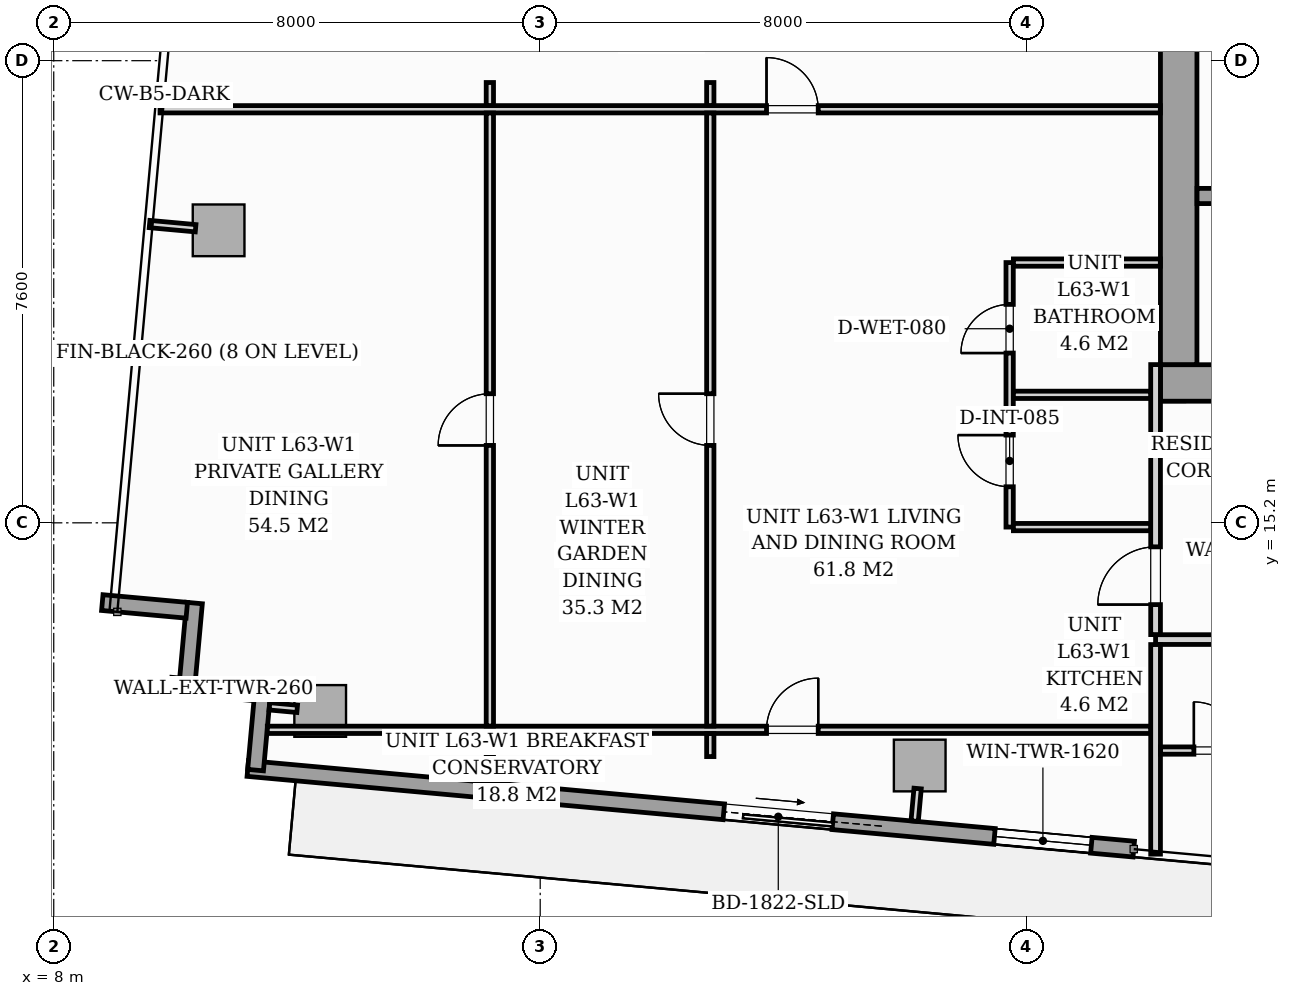
"""IFC4 building model, lengths in metres.
Left out: names, types, materials, properties, quantities, classifications, styles, units other than length and angle.
Written with IfcOpenShell. Run it as: python <this file> out.ifc"""

import sys

from ifc_helpers import new_model, si_unit, direction, frame, frame_2d, origin, origin_2d, place, context, subcontext, project, spatial, rectangle, i_section, extrude, source, transform, mapped, element, fill, save


model = new_model("IFC4")
c1 = context("Model", 3, precision=1e-05, world=origin(), true_north=direction((0.0, 1.0)))
c2 = subcontext(c1, "Body", "Model", "MODEL_VIEW")
j1 = project(units=[si_unit("LENGTHUNIT", "METRE"), si_unit("PLANEANGLEUNIT", "RADIAN")], contexts=[c1])
p1 = place(None, origin())
s1 = spatial("IfcSite", under=j1, at=p1, CompositionType="ELEMENT")
p2 = place(p1, origin())
s2 = spatial("IfcBuilding", under=s1, at=p2, CompositionType="ELEMENT")
p3 = place(p2, frame((0.0, 0.0, 219.9)))
s3 = spatial("IfcBuildingStorey", under=s2, at=p3, CompositionType="ELEMENT", Elevation=219.9)
m1 = source(origin(), c2, "Body", "SweptSolid", [
    extrude(i_section(OverallWidth=0.409, OverallDepth=0.425, WebThickness=0.033, FlangeThickness=0.052, FilletRadius=0.018, at=origin_2d()), origin(), (0.0, 0.0, 1.0), 3.296),
])
p4 = place(p3, frame((26.4, 17.4, 0.002), z_axis=(0.0, 0.0, 1.0), x_axis=(1.0, 0.0, 0.0)))
e1 = element("IfcColumn", 1, at=p4, inside=s3, PredefinedType="PILASTER", context=c2, shape_type="MappedRepresentation", body=[
    mapped(m1, transform((0.0, 0.0, 0.0), scale=1.0)),
])
m2 = source(origin(), c2, "Body", "SweptSolid", [
    extrude(rectangle(XDim=0.85, YDim=0.85, at=origin_2d()), origin(), (0.0, 0.0, 1.0), 3.296),
])
for number, where, z_axis, x_axis in (
    (2, (12.382, 12.106, 0.002), (0.0, 0.0, 1.0), (0.996, -0.091, 0.0)),
    (3, (22.241, 11.209, 0.002), (0.0, 0.0, 1.0), (0.996, -0.091, 0.0)),
    (4, (10.711, 20.01, 0.002), (0.0, 0.0, 1.0), (0.996, -0.091, 0.0)),
):
    element("IfcColumn", number, at=place(p3, frame(where, z_axis=z_axis, x_axis=x_axis)), inside=s3, PredefinedType="COLUMN", context=c2, shape_type="MappedRepresentation", body=[
        mapped(m2, transform((0.0, 0.0, 0.0), scale=1.0)),
    ])
p5 = place(p3, frame((11.319, 12.404, 0.0), z_axis=(0.0, 0.0, 1.0), x_axis=(-0.995881721538, 0.090661991521, 0.0)))
e5 = element("IfcWall", 5, at=p5, inside=s3, PredefinedType="STANDARD", context=c2, shape_type="SweptSolid", body=[
    extrude(rectangle(XDim=1.395, YDim=0.26, at=frame_2d((0.698, 0.0))), origin(), (0.0, 0.0, 1.0), 3.04),
])
p6 = place(p3, frame((10.188, 12.492, 0.0), z_axis=(0.0, 0.0, 1.0), x_axis=(0.090646191665, 0.995883159782, 0.0)))
e6 = element("IfcWall", 6, at=p6, inside=s3, PredefinedType="STANDARD", context=c2, shape_type="SweptSolid", body=[
    extrude(rectangle(XDim=1.395, YDim=0.26, at=frame_2d((0.698, 0.0))), origin(), (0.0, 0.0, 1.0), 3.04),
])
p7 = place(p3, frame((10.188, 13.762, 0.0), z_axis=(0.0, 0.0, 1.0), x_axis=(-0.995881721538, 0.090661991521, 0.0)))
e7 = element("IfcWall", 7, at=p7, inside=s3, PredefinedType="STANDARD", context=c2, shape_type="SweptSolid", body=[
    extrude(rectangle(XDim=1.395, YDim=0.26, at=frame_2d((0.698, 0.0))), origin(), (0.0, 0.0, 1.0), 3.04),
])
p8 = place(p3, frame((25.761, 9.834, 0.0), z_axis=(0.0, 0.0, 1.0), x_axis=(-0.995884584572, 0.090630536861, 0.0)))
e8 = element("IfcWall", 8, at=p8, inside=s3, PredefinedType="STANDARD", context=c2, shape_type="SweptSolid", body=[
    extrude(rectangle(XDim=14.63, YDim=0.26, at=frame_2d((7.315, 0.0))), origin(), (0.0, 0.0, 1.0), 3.04),
])
p9 = place(p8, frame((4.97, 0.0, 0.0)))
e9 = element("IfcOpeningElement", 9, at=p9, cuts=e8, PredefinedType="OPENING", context=c2, shape_type="SweptSolid", body=[
    extrude(rectangle(XDim=1.8, YDim=2.06, at=frame_2d((0.9, 1.03))), frame((0.0, 0.14, 0.0), z_axis=(0.0, -1.0, 0.0), x_axis=(1.0, 0.0, 0.0)), (0.0, 0.0, 1.0), 0.28),
])
p10 = place(p8, frame((0.7, 0.0, 0.65)))
e10 = element("IfcOpeningElement", 10, at=p10, cuts=e8, PredefinedType="OPENING", context=c2, shape_type="SweptSolid", body=[
    extrude(rectangle(XDim=1.6, YDim=1.5, at=frame_2d((0.8, 0.75))), frame((0.0, 0.14, 0.0), z_axis=(0.0, -1.0, 0.0), x_axis=(1.0, 0.0, 0.0)), (0.0, 0.0, 1.0), 0.28),
])
p11 = place(p3, frame((11.319, 11.134, 0.0), z_axis=(0.0, 0.0, 1.0), x_axis=(0.090661991521, 0.995881721538, 0.0)))
e11 = element("IfcWall", 11, at=p11, inside=s3, PredefinedType="STANDARD", context=c2, shape_type="SweptSolid", body=[
    extrude(rectangle(XDim=1.395, YDim=0.26, at=frame_2d((0.698, 0.0))), origin(), (0.0, 0.0, 1.0), 3.04),
])
p12 = place(p3, frame((26.2, 17.5, 0.0), z_axis=(0.0, 0.0, 1.0), x_axis=(1.0, 0.0, 0.0)))
e12 = element("IfcWall", 12, at=p12, inside=s3, PredefinedType="SHEAR", context=c2, shape_type="SweptSolid", body=[
    extrude(rectangle(XDim=19.6, YDim=0.6, at=frame_2d((9.8, 0.0))), origin(), (0.0, 0.0, 1.0), 3.3),
])
p13 = place(p12, frame((0.95, 0.0, 0.0)))
e13 = element("IfcOpeningElement", 13, at=p13, cuts=e12, PredefinedType="OPENING", context=c2, shape_type="SweptSolid", body=[
    extrude(rectangle(XDim=0.95, YDim=2.06, at=frame_2d((0.475, 1.03))), frame((0.0, 0.31, 0.0), z_axis=(0.0, -1.0, 0.0), x_axis=(1.0, 0.0, 0.0)), (0.0, 0.0, 1.0), 0.62),
])
p14 = place(p12, frame((9.38, 0.0, 0.0)))
e14 = element("IfcOpeningElement", 14, at=p14, cuts=e12, PredefinedType="OPENING", context=c2, shape_type="SweptSolid", body=[
    extrude(rectangle(XDim=0.85, YDim=2.0, at=frame_2d((0.425, 1.0))), frame((0.0, 0.31, 0.0), z_axis=(0.0, -1.0, 0.0), x_axis=(1.0, 0.0, 0.0)), (0.0, 0.0, 1.0), 0.62),
])
p15 = place(p12, frame((17.55, 0.0, 0.0)))
e15 = element("IfcOpeningElement", 15, at=p15, cuts=e12, PredefinedType="OPENING", context=c2, shape_type="SweptSolid", body=[
    extrude(rectangle(XDim=0.95, YDim=2.06, at=frame_2d((0.475, 1.03))), frame((0.0, 0.31, 0.0), z_axis=(0.0, -1.0, 0.0), x_axis=(1.0, 0.0, 0.0)), (0.0, 0.0, 1.0), 0.62),
])
p16 = place(p3, frame((26.5, 17.802, 0.0), z_axis=(0.0, 0.0, 1.0), x_axis=(0.0, 1.0, 0.0)))
e16 = element("IfcWall", 16, at=p16, inside=s3, PredefinedType="SHEAR", context=c2, shape_type="SweptSolid", body=[
    extrude(rectangle(XDim=5.796, YDim=0.6, at=frame_2d((2.898, 0.0))), origin(), (0.0, 0.0, 1.0), 3.3),
])
p17 = place(p3, frame((26.802, 20.575, 0.0), z_axis=(0.0, 0.0, 1.0), x_axis=(1.0, 0.0, 0.0)))
e17 = element("IfcWall", 17, at=p17, inside=s3, PredefinedType="SOLIDWALL", context=c2, shape_type="SweptSolid", body=[
    extrude(rectangle(XDim=8.148, YDim=0.25, at=frame_2d((4.074, 0.0))), origin(), (0.0, 0.0, 1.0), 3.3),
])
p18 = place(p17, frame((0.298, 0.0, 0.0)))
e18 = element("IfcOpeningElement", 18, at=p18, cuts=e17, PredefinedType="OPENING", context=c2, shape_type="SweptSolid", body=[
    extrude(rectangle(XDim=0.95, YDim=2.06, at=frame_2d((0.475, 1.03))), frame((0.0, 0.135, 0.0), z_axis=(0.0, -1.0, 0.0), x_axis=(1.0, 0.0, 0.0)), (0.0, 0.0, 1.0), 0.27),
])
p19 = place(p3, frame((26.12, 13.28, 0.0), z_axis=(0.0, 0.0, 1.0), x_axis=(1.0, 0.0, 0.0)))
e19 = element("IfcWall", 19, at=p19, inside=s3, PredefinedType="PARTITIONING", context=c2, shape_type="SweptSolid", body=[
    extrude(rectangle(XDim=19.76, YDim=0.16, at=frame_2d((9.88, 0.0))), origin(), (0.0, 0.0, 1.0), 2.556),
])
p20 = place(p19, frame((5.345, 0.0, 0.0)))
e20 = element("IfcOpeningElement", 20, at=p20, cuts=e19, PredefinedType="OPENING", context=c2, shape_type="SweptSolid", body=[
    extrude(rectangle(XDim=0.95, YDim=2.06, at=frame_2d((0.475, 1.03))), frame((0.0, 0.09, 0.0), z_axis=(0.0, -1.0, 0.0), x_axis=(1.0, 0.0, 0.0)), (0.0, 0.0, 1.0), 0.18),
])
p21 = place(p19, frame((8.612, 0.0, 0.0)))
e21 = element("IfcOpeningElement", 21, at=p21, cuts=e19, PredefinedType="OPENING", context=c2, shape_type="SweptSolid", body=[
    extrude(rectangle(XDim=0.95, YDim=2.06, at=frame_2d((0.475, 1.03))), frame((0.0, 0.09, 0.0), z_axis=(0.0, -1.0, 0.0), x_axis=(1.0, 0.0, 0.0)), (0.0, 0.0, 1.0), 0.18),
])
p22 = place(p3, frame((26.12, 9.751, 0.0), z_axis=(0.0, 0.0, 1.0), x_axis=(0.0, 1.0, 0.0)))
e22 = element("IfcWall", 22, at=p22, inside=s3, PredefinedType="PARTITIONING", context=c2, shape_type="SweptSolid", body=[
    extrude(rectangle(XDim=3.447, YDim=0.16, at=frame_2d((1.723, 0.0))), origin(), (0.0, 0.0, 1.0), 3.04),
])
p23 = place(p3, frame((26.12, 13.362, 0.0), z_axis=(0.0, 0.0, 1.0), x_axis=(0.0, 1.0, 0.0)))
e23 = element("IfcWall", 23, at=p23, inside=s3, PredefinedType="PARTITIONING", context=c2, shape_type="SweptSolid", body=[
    extrude(rectangle(XDim=4.44, YDim=0.16, at=frame_2d((2.22, 0.0))), origin(), (0.0, 0.0, 1.0), 3.04),
])
p24 = place(p23, frame((0.493, 0.0, 0.0)))
e24 = element("IfcOpeningElement", 24, at=p24, cuts=e23, PredefinedType="OPENING", context=c2, shape_type="SweptSolid", body=[
    extrude(rectangle(XDim=0.95, YDim=2.06, at=frame_2d((0.475, 1.03))), frame((0.0, 0.09, 0.0), z_axis=(0.0, -1.0, 0.0), x_axis=(1.0, 0.0, 0.0)), (0.0, 0.0, 1.0), 0.18),
])
p25 = place(p3, frame((26.202, 11.455, 0.0), z_axis=(0.0, 0.0, 1.0), x_axis=(1.0, 0.0, 0.0)))
e25 = element("IfcWall", 25, at=p25, inside=s3, PredefinedType="PARTITIONING", context=c2, shape_type="SweptSolid", body=[
    extrude(rectangle(XDim=4.098, YDim=0.12, at=frame_2d((2.049, 0.0))), origin(), (0.0, 0.0, 1.0), 2.556),
])
p26 = place(p25, frame((0.548, 0.0, 0.0)))
e26 = element("IfcOpeningElement", 26, at=p26, cuts=e25, PredefinedType="OPENING", context=c2, shape_type="SweptSolid", body=[
    extrude(rectangle(XDim=0.8, YDim=2.02, at=frame_2d((0.4, 1.01))), frame((0.0, 0.07, 0.0), z_axis=(0.0, -1.0, 0.0), x_axis=(1.0, 0.0, 0.0)), (0.0, 0.0, 1.0), 0.14),
])
p27 = place(p25, frame((2.573, 0.0, 0.0)))
e27 = element("IfcOpeningElement", 27, at=p27, cuts=e25, PredefinedType="OPENING", context=c2, shape_type="SweptSolid", body=[
    extrude(rectangle(XDim=0.85, YDim=2.05, at=frame_2d((0.425, 1.025))), frame((0.0, 0.07, 0.0), z_axis=(0.0, -1.0, 0.0), x_axis=(1.0, 0.0, 0.0)), (0.0, 0.0, 1.0), 0.14),
])
p28 = place(p3, frame((23.72, 15.13, 0.0), z_axis=(0.0, 0.0, 1.0), x_axis=(0.0, 1.0, 0.0)))
e28 = element("IfcWall", 28, at=p28, inside=s3, PredefinedType="PARTITIONING", context=c2, shape_type="SweptSolid", body=[
    extrude(rectangle(XDim=4.35, YDim=0.12, at=frame_2d((2.175, 0.0))), origin(), (0.0, 0.0, 1.0), 3.04),
])
p29 = place(p28, frame((0.663, 0.0, 0.0)))
e29 = element("IfcOpeningElement", 29, at=p29, cuts=e28, PredefinedType="OPENING", context=c2, shape_type="SweptSolid", body=[
    extrude(rectangle(XDim=0.85, YDim=2.05, at=frame_2d((0.425, 1.025))), frame((0.0, 0.07, 0.0), z_axis=(0.0, -1.0, 0.0), x_axis=(1.0, 0.0, 0.0)), (0.0, 0.0, 1.0), 0.14),
])
p30 = place(p28, frame((2.862, 0.0, 0.0)))
e30 = element("IfcOpeningElement", 30, at=p30, cuts=e28, PredefinedType="OPENING", context=c2, shape_type="SweptSolid", body=[
    extrude(rectangle(XDim=0.8, YDim=2.02, at=frame_2d((0.4, 1.01))), frame((0.0, 0.07, 0.0), z_axis=(0.0, -1.0, 0.0), x_axis=(1.0, 0.0, 0.0)), (0.0, 0.0, 1.0), 0.14),
])
p31 = place(p3, frame((23.782, 17.305, 0.0), z_axis=(0.0, 0.0, 1.0), x_axis=(1.0, 0.0, 0.0)))
e31 = element("IfcWall", 31, at=p31, inside=s3, PredefinedType="PARTITIONING", context=c2, shape_type="SweptSolid", body=[
    extrude(rectangle(XDim=2.256, YDim=0.12, at=frame_2d((1.128, 0.0))), origin(), (0.0, 0.0, 1.0), 2.382),
])
p32 = place(p3, frame((23.782, 15.13, 0.0), z_axis=(0.0, 0.0, 1.0), x_axis=(1.0, 0.0, 0.0)))
e32 = element("IfcWall", 32, at=p32, inside=s3, PredefinedType="PARTITIONING", context=c2, shape_type="SweptSolid", body=[
    extrude(rectangle(XDim=2.256, YDim=0.12, at=frame_2d((1.128, 0.0))), origin(), (0.0, 0.0, 1.0), 3.04),
])
p33 = place(p3, frame((23.782, 19.48, 0.0), z_axis=(0.0, 0.0, 1.0), x_axis=(1.0, 0.0, 0.0)))
e33 = element("IfcWall", 33, at=p33, inside=s3, PredefinedType="PARTITIONING", context=c2, shape_type="SweptSolid", body=[
    extrude(rectangle(XDim=2.416, YDim=0.12, at=frame_2d((1.208, 0.0))), origin(), (0.0, 0.0, 1.0), 3.04),
])
p34 = place(p3, frame((9.748, 22.001, 0.0), z_axis=(0.0, 0.0, 1.0), x_axis=(1.0, 0.0, 0.0)))
e34 = element("IfcWall", 34, at=p34, inside=s3, PredefinedType="PARTITIONING", context=c2, shape_type="SweptSolid", body=[
    extrude(rectangle(XDim=16.45, YDim=0.12, at=frame_2d((8.225, 0.0))), origin(), (0.0, 0.0, 1.0), 3.04),
])
p35 = place(p34, frame((9.974, 0.0, 0.0)))
e35 = element("IfcOpeningElement", 35, at=p35, cuts=e34, PredefinedType="OPENING", context=c2, shape_type="SweptSolid", body=[
    extrude(rectangle(XDim=0.85, YDim=2.05, at=frame_2d((0.425, 1.025))), frame((0.0, 0.07, 0.0), z_axis=(0.0, -1.0, 0.0), x_axis=(1.0, 0.0, 0.0)), (0.0, 0.0, 1.0), 0.14),
])
p36 = place(p3, frame((11.512, 11.796, 0.0), z_axis=(0.0, 0.0, 1.0), x_axis=(1.0, 0.0, 0.0)))
e36 = element("IfcWall", 36, at=p36, inside=s3, PredefinedType="PARTITIONING", context=c2, shape_type="SweptSolid", body=[
    extrude(rectangle(XDim=14.526, YDim=0.12, at=frame_2d((7.263, 0.0))), origin(), (0.0, 0.0, 1.0), 2.483),
])
p37 = place(p36, frame((8.21, 0.0, 0.0)))
e37 = element("IfcOpeningElement", 37, at=p37, cuts=e36, PredefinedType="OPENING", context=c2, shape_type="SweptSolid", body=[
    extrude(rectangle(XDim=0.85, YDim=2.05, at=frame_2d((0.425, 1.025))), frame((0.0, 0.07, 0.0), z_axis=(0.0, -1.0, 0.0), x_axis=(1.0, 0.0, 0.0)), (0.0, 0.0, 1.0), 0.14),
])
p38 = place(p3, frame((15.172, 11.356, 0.0), z_axis=(0.0, 0.0, 1.0), x_axis=(0.0, 1.0, 0.0)))
e38 = element("IfcWall", 38, at=p38, inside=s3, PredefinedType="PARTITIONING", context=c2, shape_type="SweptSolid", body=[
    extrude(rectangle(XDim=0.378, YDim=0.12, at=frame_2d((0.189, 0.0))), origin(), (0.0, 0.0, 1.0), 3.04),
])
p39 = place(p3, frame((15.172, 11.858, 0.0), z_axis=(0.0, 0.0, 1.0), x_axis=(0.0, 1.0, 0.0)))
e39 = element("IfcWall", 39, at=p39, inside=s3, PredefinedType="PARTITIONING", context=c2, shape_type="SweptSolid", body=[
    extrude(rectangle(XDim=10.081, YDim=0.12, at=frame_2d((5.041, 0.0))), origin(), (0.0, 0.0, 1.0), 3.04),
])
p40 = place(p39, frame((4.615, 0.0, 0.0)))
e40 = element("IfcOpeningElement", 40, at=p40, cuts=e39, PredefinedType="OPENING", context=c2, shape_type="SweptSolid", body=[
    extrude(rectangle(XDim=0.85, YDim=2.05, at=frame_2d((0.425, 1.025))), frame((0.0, 0.07, 0.0), z_axis=(0.0, -1.0, 0.0), x_axis=(1.0, 0.0, 0.0)), (0.0, 0.0, 1.0), 0.14),
])
for number, where, z_axis, x_axis in (
    (41, (15.172, 22.063, 0.0), (0.0, 0.0, 1.0), (0.0, 1.0, 0.0)),
    (42, (18.797, 11.356, 0.0), (0.0, 0.0, 1.0), (0.0, 1.0, 0.0)),
):
    element("IfcWall", number, at=place(p3, frame(where, z_axis=z_axis, x_axis=x_axis)), inside=s3, PredefinedType="PARTITIONING", context=c2, shape_type="SweptSolid", body=[
        extrude(rectangle(XDim=0.378, YDim=0.12, at=frame_2d((0.189, 0.0))), origin(), (0.0, 0.0, 1.0), 3.04),
    ])
p41 = place(p3, frame((18.797, 11.858, 0.0), z_axis=(0.0, 0.0, 1.0), x_axis=(0.0, 1.0, 0.0)))
e43 = element("IfcWall", 43, at=p41, inside=s3, PredefinedType="PARTITIONING", context=c2, shape_type="SweptSolid", body=[
    extrude(rectangle(XDim=10.081, YDim=0.12, at=frame_2d((5.041, 0.0))), origin(), (0.0, 0.0, 1.0), 3.04),
])
p42 = place(p41, frame((4.615, 0.0, 0.0)))
e44 = element("IfcOpeningElement", 44, at=p42, cuts=e43, PredefinedType="OPENING", context=c2, shape_type="SweptSolid", body=[
    extrude(rectangle(XDim=0.85, YDim=2.05, at=frame_2d((0.425, 1.025))), frame((0.0, 0.07, 0.0), z_axis=(0.0, -1.0, 0.0), x_axis=(1.0, 0.0, 0.0)), (0.0, 0.0, 1.0), 0.14),
])
p43 = place(p3, frame((18.797, 22.063, 0.0), z_axis=(0.0, 0.0, 1.0), x_axis=(0.0, 1.0, 0.0)))
e45 = element("IfcWall", 45, at=p43, inside=s3, PredefinedType="PARTITIONING", context=c2, shape_type="SweptSolid", body=[
    extrude(rectangle(XDim=0.378, YDim=0.12, at=frame_2d((0.189, 0.0))), origin(), (0.0, 0.0, 1.0), 3.04),
])
p44 = place(p3, frame((12.003, 12.141, 0.0), z_axis=(0.0, 0.0, 1.0), x_axis=(-0.995884462012, 0.090631883588, 0.0)))
e46 = element("IfcWall", 46, at=p44, inside=s3, PredefinedType="PARTITIONING", context=c2, shape_type="SweptSolid", body=[
    extrude(rectangle(XDim=0.458, YDim=0.12, at=frame_2d((0.229, 0.0))), origin(), (0.0, 0.0, 1.0), 3.04),
])
p45 = place(p3, frame((22.207, 10.831, 0.0), z_axis=(0.0, 0.0, 1.0), x_axis=(-0.090781299264, -0.995870852924, 0.0)))
e47 = element("IfcWall", 47, at=p45, inside=s3, PredefinedType="PARTITIONING", context=c2, shape_type="SweptSolid", body=[
    extrude(rectangle(XDim=0.538, YDim=0.12, at=frame_2d((0.269, 0.0))), origin(), (0.0, 0.0, 1.0), 3.04),
])
p46 = place(p3, frame((10.333, 20.045, 0.0), z_axis=(0.0, 0.0, 1.0), x_axis=(-0.995890573658, 0.09056470228, 0.0)))
e48 = element("IfcWall", 48, at=p46, inside=s3, PredefinedType="PARTITIONING", context=c2, shape_type="SweptSolid", body=[
    extrude(rectangle(XDim=0.76, YDim=0.12, at=frame_2d((0.38, 0.0))), origin(), (0.0, 0.0, 1.0), 3.04),
])
m3 = source(origin(), c2, "Body", "SweptSolid", [
    extrude(rectangle(XDim=1.8, YDim=2.06, at=frame_2d((0.9, 1.03))), frame((0.0, 0.025, 0.0), z_axis=(0.0, -1.0, 0.0), x_axis=(1.0, 0.0, 0.0)), (0.0, 0.0, 1.0), 0.05),
])
p47 = place(p9, origin())
e49 = element("IfcDoor", 49, at=p47, inside=s3, OperationType="SLIDING_TO_LEFT", PredefinedType="DOOR", context=c2, shape_type="MappedRepresentation", body=[
    mapped(m3, transform((0.0, 0.0, 0.0), scale=1.0)),
])
fill(e9, e49)
m4 = source(origin(), c2, "Body", "SweptSolid", [
    extrude(rectangle(XDim=1.6, YDim=1.5, at=frame_2d((0.8, 0.75))), frame((0.0, 0.03, 0.0), z_axis=(0.0, -1.0, 0.0), x_axis=(1.0, 0.0, 0.0)), (0.0, 0.0, 1.0), 0.06),
])
p48 = place(p10, origin())
e50 = element("IfcWindow", 50, at=p48, inside=s3, PartitioningType="SINGLE_PANEL", PredefinedType="WINDOW", context=c2, shape_type="MappedRepresentation", body=[
    mapped(m4, transform((0.0, 0.0, 0.0), scale=1.0)),
])
fill(e10, e50)
m5 = source(origin(), c2, "Body", "SweptSolid", [
    extrude(rectangle(XDim=0.8, YDim=2.02, at=frame_2d((0.4, 1.01))), frame((0.0, 0.025, 0.0), z_axis=(0.0, -1.0, 0.0), x_axis=(1.0, 0.0, 0.0)), (0.0, 0.0, 1.0), 0.05),
])
p49 = place(p26, origin())
e51 = element("IfcDoor", 51, at=p49, inside=s3, OperationType="SINGLE_SWING_LEFT", PredefinedType="DOOR", context=c2, shape_type="MappedRepresentation", body=[
    mapped(m5, transform((0.0, 0.0, 0.0), scale=1.0)),
])
fill(e26, e51)
m6 = source(origin(), c2, "Body", "SweptSolid", [
    extrude(rectangle(XDim=0.95, YDim=2.06, at=frame_2d((0.475, 1.03))), frame((0.0, 0.025, 0.0), z_axis=(0.0, -1.0, 0.0), x_axis=(1.0, 0.0, 0.0)), (0.0, 0.0, 1.0), 0.05),
])
p50 = place(p24, origin())
e52 = element("IfcDoor", 52, at=p50, inside=s3, OperationType="SINGLE_SWING_LEFT", PredefinedType="DOOR", context=c2, shape_type="MappedRepresentation", body=[
    mapped(m6, transform((0.0, 0.0, 0.0), scale=1.0)),
])
fill(e24, e52)
m7 = source(origin(), c2, "Body", "SweptSolid", [
    extrude(rectangle(XDim=0.85, YDim=2.05, at=frame_2d((0.425, 1.025))), frame((0.0, 0.025, 0.0), z_axis=(0.0, -1.0, 0.0), x_axis=(1.0, 0.0, 0.0)), (0.0, 0.0, 1.0), 0.05),
])
p51 = place(p29, origin())
e53 = element("IfcDoor", 53, at=p51, inside=s3, OperationType="SINGLE_SWING_RIGHT", PredefinedType="DOOR", context=c2, shape_type="MappedRepresentation", body=[
    mapped(m7, transform((0.0, 0.0, 0.0), scale=1.0)),
])
fill(e29, e53)
p52 = place(p30, origin())
e54 = element("IfcDoor", 54, at=p52, inside=s3, OperationType="SINGLE_SWING_LEFT", PredefinedType="DOOR", context=c2, shape_type="MappedRepresentation", body=[
    mapped(m5, transform((0.0, 0.0, 0.0), scale=1.0)),
])
fill(e30, e54)
p53 = place(p35, origin())
e55 = element("IfcDoor", 55, at=p53, inside=s3, OperationType="SINGLE_SWING_LEFT", PredefinedType="DOOR", context=c2, shape_type="MappedRepresentation", body=[
    mapped(m7, transform((0.0, 0.0, 0.0), scale=1.0)),
])
fill(e35, e55)
p54 = place(p37, origin())
e56 = element("IfcDoor", 56, at=p54, inside=s3, OperationType="SINGLE_SWING_RIGHT", PredefinedType="DOOR", context=c2, shape_type="MappedRepresentation", body=[
    mapped(m7, transform((0.0, 0.0, 0.0), scale=1.0)),
])
fill(e37, e56)
p55 = place(p40, origin())
e57 = element("IfcDoor", 57, at=p55, inside=s3, OperationType="SINGLE_SWING_LEFT", PredefinedType="DOOR", context=c2, shape_type="MappedRepresentation", body=[
    mapped(m7, transform((0.0, 0.0, 0.0), scale=1.0)),
])
fill(e40, e57)
p56 = place(p42, origin())
e58 = element("IfcDoor", 58, at=p56, inside=s3, OperationType="SINGLE_SWING_RIGHT", PredefinedType="DOOR", context=c2, shape_type="MappedRepresentation", body=[
    mapped(m7, transform((0.0, 0.0, 0.0), scale=1.0)),
])
fill(e44, e58)
save(model, sys.argv[1])
